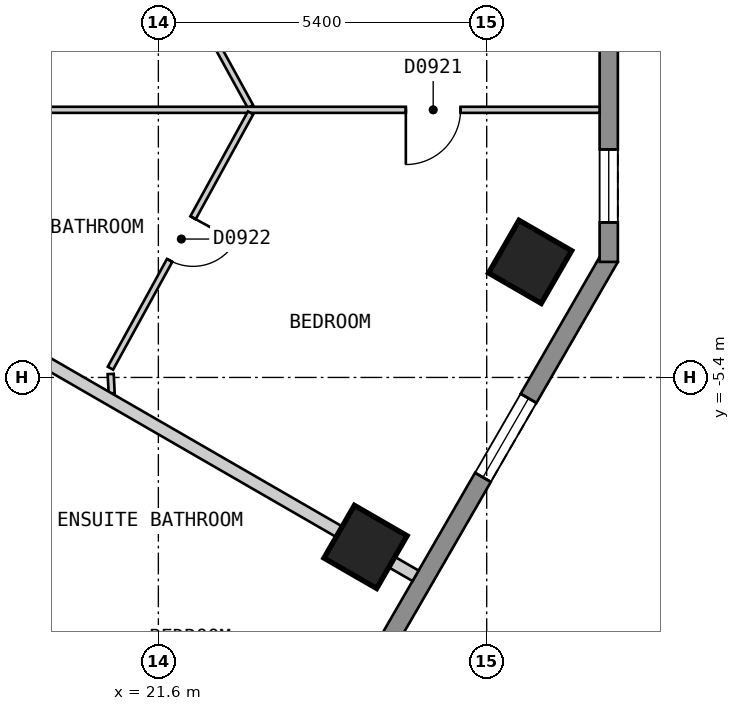
"""IFC4 building model, lengths in metres.
Left out: names, types, materials, properties, quantities, classifications, styles, units other than length and angle.
Written with IfcOpenShell. Run it as: python <this file> out.ifc"""

import sys

from ifc_helpers import new_model, si_unit, direction, frame, frame_2d, origin, origin_2d, place, context, subcontext, project, spatial, polyline, rectangle, outline, extrude, element, fill, save


model = new_model("IFC4")
c1 = context("Model", 3, precision=1e-05, world=origin(), true_north=direction((0.0, 1.0)))
c2 = subcontext(c1, "Body", "Model", "MODEL_VIEW")
j1 = project(units=[si_unit("LENGTHUNIT", "METRE"), si_unit("PLANEANGLEUNIT", "RADIAN")], contexts=[c1])
p1 = place(None, origin())
s1 = spatial("IfcSite", under=j1, at=p1, CompositionType="ELEMENT")
p2 = place(p1, origin())
s2 = spatial("IfcBuilding", under=s1, at=p2, CompositionType="ELEMENT")
p3 = place(p2, frame((0.0, 0.0, 90.0)))
s3 = spatial("IfcBuildingStorey", under=s2, at=p3, CompositionType="ELEMENT", Elevation=90.0)
for number, where, z_axis, x_axis in (
    (1, (25.007, -8.187, 0.0), (0.0, 0.0, 1.0), (0.5, 0.866, 0.0)),
    (2, (27.714, -3.499, 0.0), (0.0, 0.0, 1.0), (0.5, 0.866, 0.0)),
):
    element("IfcColumn", number, at=place(p3, frame(where, z_axis=z_axis, x_axis=x_axis)), inside=s3, PredefinedType="COLUMN", context=c2, shape_type="SweptSolid", body=[
        extrude(rectangle(XDim=1.0, YDim=1.0, at=origin_2d()), origin(), (0.0, 0.0, 1.0), 3.0),
    ])
p4 = place(p3, frame((17.479, -23.425, 0.0), z_axis=(0.0, 0.0, 1.0), x_axis=(0.500035407905, 0.866004960056, 0.0)))
e3 = element("IfcWall", 3, at=p4, inside=s3, PredefinedType="SOLIDWALL", context=c2, shape_type="SweptSolid", body=[
    extrude(outline(polyline([(0.0, -0.15), (23.094, -0.15), (23.014, 0.15), (0.08, 0.15), (0.0, -0.15)])), origin(), (0.0, 0.0, 1.0), 2.7),
])
p5 = place(p4, frame((2.677, 0.0, 0.15)))
e4 = element("IfcOpeningElement", 4, at=p5, cuts=e3, PredefinedType="OPENING", context=c2, shape_type="SweptSolid", body=[
    extrude(rectangle(XDim=1.5, YDim=2.1, at=frame_2d((0.75, 1.05))), frame((0.0, 0.16, 0.0), z_axis=(0.0, -1.0, 0.0), x_axis=(1.0, 0.0, 0.0)), (0.0, 0.0, 1.0), 0.32),
])
p6 = place(p4, frame((8.091, 0.0, 0.15)))
e5 = element("IfcOpeningElement", 5, at=p6, cuts=e3, PredefinedType="OPENING", context=c2, shape_type="SweptSolid", body=[
    extrude(rectangle(XDim=1.5, YDim=2.1, at=frame_2d((0.75, 1.05))), frame((0.0, 0.16, 0.0), z_axis=(0.0, -1.0, 0.0), x_axis=(1.0, 0.0, 0.0)), (0.0, 0.0, 1.0), 0.32),
])
p7 = place(p4, frame((13.504, 0.0, 0.15)))
e6 = element("IfcOpeningElement", 6, at=p7, cuts=e3, PredefinedType="OPENING", context=c2, shape_type="SweptSolid", body=[
    extrude(rectangle(XDim=1.5, YDim=2.1, at=frame_2d((0.75, 1.05))), frame((0.0, 0.16, 0.0), z_axis=(0.0, -1.0, 0.0), x_axis=(1.0, 0.0, 0.0)), (0.0, 0.0, 1.0), 0.32),
])
p8 = place(p4, frame((18.917, 0.0, 0.15)))
e7 = element("IfcOpeningElement", 7, at=p8, cuts=e3, PredefinedType="OPENING", context=c2, shape_type="SweptSolid", body=[
    extrude(rectangle(XDim=1.5, YDim=2.1, at=frame_2d((0.75, 1.05))), frame((0.0, 0.16, 0.0), z_axis=(0.0, -1.0, 0.0), x_axis=(1.0, 0.0, 0.0)), (0.0, 0.0, 1.0), 0.32),
])
p9 = place(p3, frame((29.007, -3.5, 0.0), z_axis=(0.0, 0.0, 1.0), x_axis=(0.0, 1.0, 0.0)))
e8 = element("IfcWall", 8, at=p9, inside=s3, PredefinedType="SOLIDWALL", context=c2, shape_type="SweptSolid", body=[
    extrude(outline(polyline([(0.0, -0.15), (5.0, -0.15), (4.92, 0.15), (0.08, 0.15), (0.0, -0.15)])), origin(), (0.0, 0.0, 1.0), 2.7),
])
p10 = place(p9, frame((0.65, 0.0, 0.15)))
e9 = element("IfcOpeningElement", 9, at=p10, cuts=e8, PredefinedType="OPENING", context=c2, shape_type="SweptSolid", body=[
    extrude(rectangle(XDim=1.2, YDim=2.1, at=frame_2d((0.6, 1.05))), frame((0.0, 0.16, 0.0), z_axis=(0.0, -1.0, 0.0), x_axis=(1.0, 0.0, 0.0)), (0.0, 0.0, 1.0), 0.32),
])
p11 = place(p3, frame((20.807, 3.255, 0.0), z_axis=(0.0, 0.0, 1.0), x_axis=(0.481604009855, -0.876388942018, 0.0)))
e10 = element("IfcWall", 10, at=p11, inside=s3, PredefinedType="PARTITIONING", context=c2, shape_type="SweptSolid", body=[
    extrude(rectangle(XDim=4.795, YDim=0.1, at=frame_2d((2.397, 0.0))), origin(), (0.0, 0.0, 1.0), 2.7),
])
p12 = place(p3, frame((20.816, -5.343, 0.0), z_axis=(0.0, 0.0, 1.0), x_axis=(0.050626241319, -0.998717669659, 0.0)))
e11 = element("IfcWall", 11, at=p12, inside=s3, PredefinedType="PARTITIONING", context=c2, shape_type="SweptSolid", body=[
    extrude(rectangle(XDim=0.318, YDim=0.1, at=frame_2d((0.159, 0.0))), origin(), (0.0, 0.0, 1.0), 2.7),
])
p13 = place(p3, frame((18.591, -0.999, 0.0), z_axis=(0.0, 0.0, 1.0), x_axis=(1.0, 0.0, 0.0)))
e12 = element("IfcWall", 12, at=p13, inside=s3, PredefinedType="PARTITIONING", context=c2, shape_type="SweptSolid", body=[
    extrude(rectangle(XDim=10.266, YDim=0.1, at=frame_2d((5.133, 0.0))), origin(), (0.0, 0.0, 1.0), 2.7),
])
p14 = place(p13, frame((7.079, 0.0, 0.0)))
e13 = element("IfcOpeningElement", 13, at=p14, cuts=e12, PredefinedType="OPENING", context=c2, shape_type="SweptSolid", body=[
    extrude(rectangle(XDim=0.9, YDim=2.1, at=frame_2d((0.45, 1.05))), frame((0.0, 0.06, 0.0), z_axis=(0.0, -1.0, 0.0), x_axis=(1.0, 0.0, 0.0)), (0.0, 0.0, 1.0), 0.12),
])
p15 = place(p3, frame((20.812, -5.248, 0.0), z_axis=(0.0, 0.0, 1.0), x_axis=(0.481196609449, 0.876612698434, 0.0)))
e14 = element("IfcWall", 14, at=p15, inside=s3, PredefinedType="PARTITIONING", context=c2, shape_type="SweptSolid", body=[
    extrude(rectangle(XDim=4.79, YDim=0.1, at=frame_2d((2.395, 0.0))), origin(), (0.0, 0.0, 1.0), 2.7),
])
p16 = place(p15, frame((2.023, 0.0, 0.0)))
e15 = element("IfcOpeningElement", 15, at=p16, cuts=e14, PredefinedType="OPENING", context=c2, shape_type="SweptSolid", body=[
    extrude(rectangle(XDim=0.8, YDim=2.1, at=frame_2d((0.4, 1.05))), frame((0.0, 0.06, 0.0), z_axis=(0.0, -1.0, 0.0), x_axis=(1.0, 0.0, 0.0)), (0.0, 0.0, 1.0), 0.12),
])
p17 = place(p3, frame((17.169, -3.662, 0.0), z_axis=(0.0, 0.0, 1.0), x_axis=(0.866047370643, -0.499961950354, 0.0)))
e16 = element("IfcWall", 16, at=p17, inside=s3, PredefinedType="PARTITIONING", context=c2, shape_type="SweptSolid", body=[
    extrude(rectangle(XDim=10.001, YDim=0.2, at=frame_2d((5.0, 0.0))), origin(), (0.0, 0.0, 1.0), 2.7),
])
p18 = place(p8, origin())
e17 = element("IfcWindow", 17, at=p18, inside=s3, PartitioningType="SINGLE_PANEL", PredefinedType="WINDOW", context=c2, shape_type="SweptSolid", body=[
    extrude(rectangle(XDim=1.5, YDim=2.1, at=frame_2d((0.75, 1.05))), frame((0.0, 0.03, 0.0), z_axis=(0.0, -1.0, 0.0), x_axis=(1.0, 0.0, 0.0)), (0.0, 0.0, 1.0), 0.06),
])
fill(e7, e17)
p19 = place(p10, origin())
e18 = element("IfcWindow", 18, at=p19, inside=s3, PartitioningType="SINGLE_PANEL", PredefinedType="WINDOW", context=c2, shape_type="SweptSolid", body=[
    extrude(rectangle(XDim=1.2, YDim=2.1, at=frame_2d((0.6, 1.05))), frame((0.0, 0.03, 0.0), z_axis=(0.0, -1.0, 0.0), x_axis=(1.0, 0.0, 0.0)), (0.0, 0.0, 1.0), 0.06),
])
fill(e9, e18)
p20 = place(p14, origin())
e19 = element("IfcDoor", 19, at=p20, inside=s3, OperationType="SINGLE_SWING_LEFT", PredefinedType="DOOR", context=c2, shape_type="SweptSolid", body=[
    extrude(rectangle(XDim=0.9, YDim=2.1, at=frame_2d((0.45, 1.05))), frame((0.0, 0.025, 0.0), z_axis=(0.0, -1.0, 0.0), x_axis=(1.0, 0.0, 0.0)), (0.0, 0.0, 1.0), 0.05),
])
fill(e13, e19)
p21 = place(p16, origin())
e20 = element("IfcDoor", 20, at=p21, inside=s3, OperationType="SINGLE_SWING_RIGHT", PredefinedType="DOOR", context=c2, shape_type="SweptSolid", body=[
    extrude(rectangle(XDim=0.8, YDim=2.1, at=frame_2d((0.4, 1.05))), frame((0.0, 0.025, 0.0), z_axis=(0.0, -1.0, 0.0), x_axis=(1.0, 0.0, 0.0)), (0.0, 0.0, 1.0), 0.05),
])
fill(e15, e20)
save(model, sys.argv[1])
